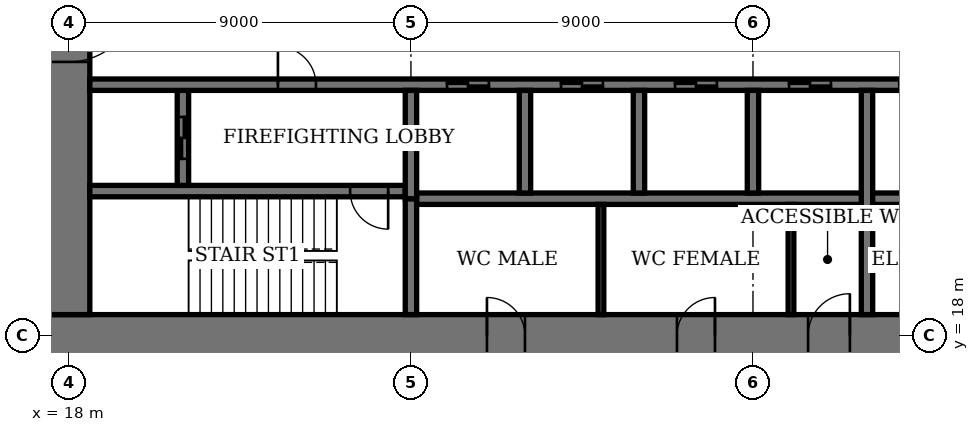
"""IFC4 building model, lengths in metres.
Left out: names, types, materials, properties, quantities, classifications, styles, units other than length and angle.
Written with IfcOpenShell. Run it as: python <this file> out.ifc"""

import sys

from ifc_helpers import new_model, si_unit, direction, frame, frame_2d, origin, place, context, subcontext, project, spatial, rectangle, extrude, element, fill, save


model = new_model("IFC4")
c1 = context("Model", 3, precision=1e-05, world=origin(), true_north=direction((0.0, 1.0)))
c2 = subcontext(c1, "Body", "Model", "MODEL_VIEW")
j1 = project(units=[si_unit("LENGTHUNIT", "METRE"), si_unit("PLANEANGLEUNIT", "RADIAN")], contexts=[c1])
p1 = place(None, origin())
s1 = spatial("IfcSite", under=j1, at=p1, CompositionType="ELEMENT")
p2 = place(p1, origin())
s2 = spatial("IfcBuilding", under=s1, at=p2, CompositionType="ELEMENT")
p3 = place(p2, frame((0.0, 0.0, 35.8)))
s3 = spatial("IfcBuildingStorey", under=s2, at=p3, CompositionType="ELEMENT", Elevation=35.8)
p4 = place(p3, frame((17.45, 18.0, 0.0), z_axis=(0.0, 0.0, 1.0), x_axis=(1.0, 0.0, 0.0)))
e1 = element("IfcWall", 1, at=p4, inside=s3, PredefinedType="SHEAR", context=c2, shape_type="SweptSolid", body=[
    extrude(rectangle(XDim=28.1, YDim=1.1, at=frame_2d((14.05, 0.0))), origin(), (0.0, 0.0, 1.0), 4.0),
])
p5 = place(p4, frame((11.55, 0.0, 0.0)))
e2 = element("IfcOpeningElement", 2, at=p5, cuts=e1, PredefinedType="OPENING", context=c2, shape_type="SweptSolid", body=[
    extrude(rectangle(XDim=1.0, YDim=2.4, at=frame_2d((0.5, 1.2))), frame((0.0, 0.56, 0.0), z_axis=(0.0, -1.0, 0.0), x_axis=(1.0, 0.0, 0.0)), (0.0, 0.0, 1.0), 1.12),
])
p6 = place(p4, frame((16.55, 0.0, 0.0)))
e3 = element("IfcOpeningElement", 3, at=p6, cuts=e1, PredefinedType="OPENING", context=c2, shape_type="SweptSolid", body=[
    extrude(rectangle(XDim=1.0, YDim=2.4, at=frame_2d((0.5, 1.2))), frame((0.0, 0.56, 0.0), z_axis=(0.0, -1.0, 0.0), x_axis=(1.0, 0.0, 0.0)), (0.0, 0.0, 1.0), 1.12),
])
p7 = place(p4, frame((20.0, 0.0, 0.0)))
e4 = element("IfcOpeningElement", 4, at=p7, cuts=e1, PredefinedType="OPENING", context=c2, shape_type="SweptSolid", body=[
    extrude(rectangle(XDim=1.1, YDim=2.4, at=frame_2d((0.55, 1.2))), frame((0.0, 0.56, 0.0), z_axis=(0.0, -1.0, 0.0), x_axis=(1.0, 0.0, 0.0)), (0.0, 0.0, 1.0), 1.12),
])
p8 = place(p4, frame((24.05, 0.0, 0.0)))
e5 = element("IfcOpeningElement", 5, at=p8, cuts=e1, PredefinedType="OPENING", context=c2, shape_type="SweptSolid", body=[
    extrude(rectangle(XDim=1.0, YDim=2.4, at=frame_2d((0.5, 1.2))), frame((0.0, 0.56, 0.0), z_axis=(0.0, -1.0, 0.0), x_axis=(1.0, 0.0, 0.0)), (0.0, 0.0, 1.0), 1.12),
])
p9 = place(p3, frame((18.0, 35.45, 0.0), z_axis=(0.0, 0.0, 1.0), x_axis=(0.0, -1.0, 0.0)))
e6 = element("IfcWall", 6, at=p9, inside=s3, PredefinedType="SHEAR", context=c2, shape_type="SweptSolid", body=[
    extrude(rectangle(XDim=16.9, YDim=1.1, at=frame_2d((8.45, 0.0))), origin(), (0.0, 0.0, 1.0), 4.0),
])
p10 = place(p9, frame((8.45, 0.0, 0.0)))
e7 = element("IfcOpeningElement", 7, at=p10, cuts=e6, PredefinedType="OPENING", context=c2, shape_type="SweptSolid", body=[
    extrude(rectangle(XDim=1.8, YDim=2.4, at=frame_2d((0.9, 1.2))), frame((0.0, 0.56, 0.0), z_axis=(0.0, -1.0, 0.0), x_axis=(1.0, 0.0, 0.0)), (0.0, 0.0, 1.0), 1.12),
])
p11 = place(p3, frame((18.55, 21.8, 0.0), z_axis=(0.0, 0.0, 1.0), x_axis=(1.0, 0.0, 0.0)))
e8 = element("IfcWall", 8, at=p11, inside=s3, PredefinedType="SHEAR", context=c2, shape_type="SweptSolid", body=[
    extrude(rectangle(XDim=8.3, YDim=0.3, at=frame_2d((4.15, 0.0))), origin(), (0.0, 0.0, 1.0), 4.0),
])
p12 = place(p11, frame((6.85, 0.0, 0.0)))
e9 = element("IfcOpeningElement", 9, at=p12, cuts=e8, PredefinedType="OPENING", context=c2, shape_type="SweptSolid", body=[
    extrude(rectangle(XDim=1.0, YDim=2.4, at=frame_2d((0.5, 1.2))), frame((0.0, 0.16, 0.0), z_axis=(0.0, -1.0, 0.0), x_axis=(1.0, 0.0, 0.0)), (0.0, 0.0, 1.0), 0.32),
])
p13 = place(p3, frame((27.0, 18.55, 0.0), z_axis=(0.0, 0.0, 1.0), x_axis=(0.0, 1.0, 0.0)))
e10 = element("IfcWall", 10, at=p13, inside=s3, PredefinedType="SHEAR", context=c2, shape_type="SweptSolid", body=[
    extrude(rectangle(XDim=3.05, YDim=0.3, at=frame_2d((1.525, 0.0))), origin(), (0.0, 0.0, 1.0), 4.0),
])
p14 = place(p3, frame((21.0, 21.95, 0.0), z_axis=(0.0, 0.0, 1.0), x_axis=(0.0, 1.0, 0.0)))
e11 = element("IfcWall", 11, at=p14, inside=s3, PredefinedType="SHEAR", context=c2, shape_type="SweptSolid", body=[
    extrude(rectangle(XDim=2.5, YDim=0.3, at=frame_2d((1.25, 0.0))), origin(), (0.0, 0.0, 1.0), 4.0),
])
p15 = place(p14, frame((0.7, 0.0, 0.0)))
e12 = element("IfcOpeningElement", 12, at=p15, cuts=e11, PredefinedType="OPENING", context=c2, shape_type="SweptSolid", body=[
    extrude(rectangle(XDim=1.1, YDim=2.4, at=frame_2d((0.55, 1.2))), frame((0.0, 0.16, 0.0), z_axis=(0.0, -1.0, 0.0), x_axis=(1.0, 0.0, 0.0)), (0.0, 0.0, 1.0), 0.32),
])
p16 = place(p3, frame((18.55, 24.6, 0.0), z_axis=(0.0, 0.0, 1.0), x_axis=(1.0, 0.0, 0.0)))
e13 = element("IfcWall", 13, at=p16, inside=s3, PredefinedType="SHEAR", context=c2, shape_type="SweptSolid", body=[
    extrude(rectangle(XDim=25.9, YDim=0.3, at=frame_2d((12.95, 0.0))), origin(), (0.0, 0.0, 1.0), 4.0),
])
p17 = place(p16, frame((4.95, 0.0, 0.0)))
e14 = element("IfcOpeningElement", 14, at=p17, cuts=e13, PredefinedType="OPENING", context=c2, shape_type="SweptSolid", body=[
    extrude(rectangle(XDim=1.0, YDim=2.4, at=frame_2d((0.5, 1.2))), frame((0.0, 0.16, 0.0), z_axis=(0.0, -1.0, 0.0), x_axis=(1.0, 0.0, 0.0)), (0.0, 0.0, 1.0), 0.32),
])
p18 = place(p16, frame((24.5, 0.0, 0.0)))
e15 = element("IfcOpeningElement", 15, at=p18, cuts=e13, PredefinedType="OPENING", context=c2, shape_type="SweptSolid", body=[
    extrude(rectangle(XDim=0.9, YDim=2.1, at=frame_2d((0.45, 1.05))), frame((0.0, 0.16, 0.0), z_axis=(0.0, -1.0, 0.0), x_axis=(1.0, 0.0, 0.0)), (0.0, 0.0, 1.0), 0.32),
])
p19 = place(p16, frame((9.4, 0.0, 0.0)))
e16 = element("IfcOpeningElement", 16, at=p19, cuts=e13, PredefinedType="OPENING", context=c2, shape_type="SweptSolid", body=[
    extrude(rectangle(XDim=1.1, YDim=2.4, at=frame_2d((0.55, 1.2))), frame((0.0, 0.16, 0.0), z_axis=(0.0, -1.0, 0.0), x_axis=(1.0, 0.0, 0.0)), (0.0, 0.0, 1.0), 0.32),
])
p20 = place(p16, frame((12.4, 0.0, 0.0)))
e17 = element("IfcOpeningElement", 17, at=p20, cuts=e13, PredefinedType="OPENING", context=c2, shape_type="SweptSolid", body=[
    extrude(rectangle(XDim=1.1, YDim=2.4, at=frame_2d((0.55, 1.2))), frame((0.0, 0.16, 0.0), z_axis=(0.0, -1.0, 0.0), x_axis=(1.0, 0.0, 0.0)), (0.0, 0.0, 1.0), 0.32),
])
p21 = place(p16, frame((15.4, 0.0, 0.0)))
e18 = element("IfcOpeningElement", 18, at=p21, cuts=e13, PredefinedType="OPENING", context=c2, shape_type="SweptSolid", body=[
    extrude(rectangle(XDim=1.1, YDim=2.4, at=frame_2d((0.55, 1.2))), frame((0.0, 0.16, 0.0), z_axis=(0.0, -1.0, 0.0), x_axis=(1.0, 0.0, 0.0)), (0.0, 0.0, 1.0), 0.32),
])
p22 = place(p16, frame((18.4, 0.0, 0.0)))
e19 = element("IfcOpeningElement", 19, at=p22, cuts=e13, PredefinedType="OPENING", context=c2, shape_type="SweptSolid", body=[
    extrude(rectangle(XDim=1.1, YDim=2.4, at=frame_2d((0.55, 1.2))), frame((0.0, 0.16, 0.0), z_axis=(0.0, -1.0, 0.0), x_axis=(1.0, 0.0, 0.0)), (0.0, 0.0, 1.0), 0.32),
])
p23 = place(p16, frame((21.3, 0.0, 0.0)))
e20 = element("IfcOpeningElement", 20, at=p23, cuts=e13, PredefinedType="OPENING", context=c2, shape_type="SweptSolid", body=[
    extrude(rectangle(XDim=1.3, YDim=2.4, at=frame_2d((0.65, 1.2))), frame((0.0, 0.16, 0.0), z_axis=(0.0, -1.0, 0.0), x_axis=(1.0, 0.0, 0.0)), (0.0, 0.0, 1.0), 0.32),
])
p24 = place(p3, frame((27.15, 21.6, 0.0), z_axis=(0.0, 0.0, 1.0), x_axis=(1.0, 0.0, 0.0)))
e21 = element("IfcWall", 21, at=p24, inside=s3, PredefinedType="SHEAR", context=c2, shape_type="SweptSolid", body=[
    extrude(rectangle(XDim=17.3, YDim=0.3, at=frame_2d((8.65, 0.0))), origin(), (0.0, 0.0, 1.0), 4.0),
])
for number, where, z_axis, x_axis in (
    (22, (30.0, 21.75, 0.0), (0.0, 0.0, 1.0), (0.0, 1.0, 0.0)),
    (23, (33.0, 21.75, 0.0), (0.0, 0.0, 1.0), (0.0, 1.0, 0.0)),
    (24, (36.0, 21.75, 0.0), (0.0, 0.0, 1.0), (0.0, 1.0, 0.0)),
):
    element("IfcWall", number, at=place(p3, frame(where, z_axis=z_axis, x_axis=x_axis)), inside=s3, PredefinedType="SHEAR", context=c2, shape_type="SweptSolid", body=[
        extrude(rectangle(XDim=2.7, YDim=0.3, at=frame_2d((1.35, 0.0))), origin(), (0.0, 0.0, 1.0), 4.0),
    ])
p25 = place(p3, frame((39.0, 18.55, 0.0), z_axis=(0.0, 0.0, 1.0), x_axis=(0.0, 1.0, 0.0)))
e25 = element("IfcWall", 25, at=p25, inside=s3, PredefinedType="SHEAR", context=c2, shape_type="SweptSolid", body=[
    extrude(rectangle(XDim=5.9, YDim=0.3, at=frame_2d((2.95, 0.0))), origin(), (0.0, 0.0, 1.0), 4.0),
])
p26 = place(p3, frame((27.0, 21.6, 0.0), z_axis=(0.0, 0.0, 1.0), x_axis=(0.0, 1.0, 0.0)))
e26 = element("IfcWall", 26, at=p26, inside=s3, PredefinedType="SHEAR", context=c2, shape_type="SweptSolid", body=[
    extrude(rectangle(XDim=2.85, YDim=0.3, at=frame_2d((1.425, 0.0))), origin(), (0.0, 0.0, 1.0), 4.0),
])
for number, where, z_axis, x_axis in (
    (27, (32.0, 18.55, 0.0), (0.0, 0.0, 1.0), (0.0, 1.0, 0.0)),
    (28, (37.0, 18.55, 0.0), (0.0, 0.0, 1.0), (0.0, 1.0, 0.0)),
):
    element("IfcWall", number, at=place(p3, frame(where, z_axis=z_axis, x_axis=x_axis)), inside=s3, PredefinedType="PARTITIONING", context=c2, shape_type="SweptSolid", body=[
        extrude(rectangle(XDim=2.9, YDim=0.15, at=frame_2d((1.45, 0.0))), origin(), (0.0, 0.0, 1.0), 3.75),
    ])
p27 = place(p10, origin())
e29 = element("IfcDoor", 29, at=p27, inside=s3, OperationType="DOUBLE_DOOR_DOUBLE_SWING", PredefinedType="DOOR", context=c2, shape_type="SweptSolid", body=[
    extrude(rectangle(XDim=1.8, YDim=2.4, at=frame_2d((0.9, 1.2))), frame((0.0, 0.03, 0.0), z_axis=(0.0, -1.0, 0.0), x_axis=(1.0, 0.0, 0.0)), (0.0, 0.0, 1.0), 0.06),
    extrude(rectangle(XDim=0.04, YDim=2.4, at=frame_2d((0.02, 1.2))), frame((0.0, 0.55, 0.0), z_axis=(0.0, -1.0, 0.0), x_axis=(1.0, 0.0, 0.0)), (0.0, 0.0, 1.0), 1.1),
    extrude(rectangle(XDim=0.04, YDim=2.4, at=frame_2d((1.78, 1.2))), frame((0.0, 0.55, 0.0), z_axis=(0.0, -1.0, 0.0), x_axis=(1.0, 0.0, 0.0)), (0.0, 0.0, 1.0), 1.1),
    extrude(rectangle(XDim=1.8, YDim=0.04, at=frame_2d((0.9, 2.38))), frame((0.0, 0.55, 0.0), z_axis=(0.0, -1.0, 0.0), x_axis=(1.0, 0.0, 0.0)), (0.0, 0.0, 1.0), 1.1),
])
fill(e7, e29)
p28 = place(p5, origin())
e30 = element("IfcDoor", 30, at=p28, inside=s3, OperationType="SINGLE_SWING_RIGHT", PredefinedType="DOOR", context=c2, shape_type="SweptSolid", body=[
    extrude(rectangle(XDim=1.0, YDim=2.4, at=frame_2d((0.5, 1.2))), frame((0.0, 0.025, 0.0), z_axis=(0.0, -1.0, 0.0), x_axis=(1.0, 0.0, 0.0)), (0.0, 0.0, 1.0), 0.05),
    extrude(rectangle(XDim=0.04, YDim=2.4, at=frame_2d((0.02, 1.2))), frame((0.0, 0.4, 0.0), z_axis=(0.0, -1.0, 0.0), x_axis=(1.0, 0.0, 0.0)), (0.0, 0.0, 1.0), 0.8),
    extrude(rectangle(XDim=0.04, YDim=2.4, at=frame_2d((0.98, 1.2))), frame((0.0, 0.4, 0.0), z_axis=(0.0, -1.0, 0.0), x_axis=(1.0, 0.0, 0.0)), (0.0, 0.0, 1.0), 0.8),
    extrude(rectangle(XDim=1.0, YDim=0.04, at=frame_2d((0.5, 2.38))), frame((0.0, 0.4, 0.0), z_axis=(0.0, -1.0, 0.0), x_axis=(1.0, 0.0, 0.0)), (0.0, 0.0, 1.0), 0.8),
])
fill(e2, e30)
p29 = place(p6, origin())
e31 = element("IfcDoor", 31, at=p29, inside=s3, OperationType="SINGLE_SWING_LEFT", PredefinedType="DOOR", context=c2, shape_type="SweptSolid", body=[
    extrude(rectangle(XDim=1.0, YDim=2.4, at=frame_2d((0.5, 1.2))), frame((0.0, 0.025, 0.0), z_axis=(0.0, -1.0, 0.0), x_axis=(1.0, 0.0, 0.0)), (0.0, 0.0, 1.0), 0.05),
    extrude(rectangle(XDim=0.04, YDim=2.4, at=frame_2d((0.02, 1.2))), frame((0.0, 0.4, 0.0), z_axis=(0.0, -1.0, 0.0), x_axis=(1.0, 0.0, 0.0)), (0.0, 0.0, 1.0), 0.8),
    extrude(rectangle(XDim=0.04, YDim=2.4, at=frame_2d((0.98, 1.2))), frame((0.0, 0.4, 0.0), z_axis=(0.0, -1.0, 0.0), x_axis=(1.0, 0.0, 0.0)), (0.0, 0.0, 1.0), 0.8),
    extrude(rectangle(XDim=1.0, YDim=0.04, at=frame_2d((0.5, 2.38))), frame((0.0, 0.4, 0.0), z_axis=(0.0, -1.0, 0.0), x_axis=(1.0, 0.0, 0.0)), (0.0, 0.0, 1.0), 0.8),
])
fill(e3, e31)
p30 = place(p7, origin())
e32 = element("IfcDoor", 32, at=p30, inside=s3, OperationType="SINGLE_SWING_LEFT", PredefinedType="DOOR", context=c2, shape_type="SweptSolid", body=[
    extrude(rectangle(XDim=1.1, YDim=2.4, at=frame_2d((0.55, 1.2))), frame((0.0, 0.025, 0.0), z_axis=(0.0, -1.0, 0.0), x_axis=(1.0, 0.0, 0.0)), (0.0, 0.0, 1.0), 0.05),
    extrude(rectangle(XDim=0.04, YDim=2.4, at=frame_2d((0.02, 1.2))), frame((0.0, 0.44, 0.0), z_axis=(0.0, -1.0, 0.0), x_axis=(1.0, 0.0, 0.0)), (0.0, 0.0, 1.0), 0.88),
    extrude(rectangle(XDim=0.04, YDim=2.4, at=frame_2d((1.08, 1.2))), frame((0.0, 0.44, 0.0), z_axis=(0.0, -1.0, 0.0), x_axis=(1.0, 0.0, 0.0)), (0.0, 0.0, 1.0), 0.88),
    extrude(rectangle(XDim=1.1, YDim=0.04, at=frame_2d((0.55, 2.38))), frame((0.0, 0.44, 0.0), z_axis=(0.0, -1.0, 0.0), x_axis=(1.0, 0.0, 0.0)), (0.0, 0.0, 1.0), 0.88),
])
fill(e4, e32)
p31 = place(p12, origin())
e33 = element("IfcDoor", 33, at=p31, inside=s3, OperationType="SINGLE_SWING_RIGHT", PredefinedType="DOOR", context=c2, shape_type="SweptSolid", body=[
    extrude(rectangle(XDim=1.0, YDim=2.4, at=frame_2d((0.5, 1.2))), frame((0.0, 0.03, 0.0), z_axis=(0.0, -1.0, 0.0), x_axis=(1.0, 0.0, 0.0)), (0.0, 0.0, 1.0), 0.06),
])
fill(e9, e33)
p32 = place(p17, origin())
e34 = element("IfcDoor", 34, at=p32, inside=s3, OperationType="SINGLE_SWING_RIGHT", PredefinedType="DOOR", context=c2, shape_type="SweptSolid", body=[
    extrude(rectangle(XDim=1.0, YDim=2.4, at=frame_2d((0.5, 1.2))), frame((0.0, 0.03, 0.0), z_axis=(0.0, -1.0, 0.0), x_axis=(1.0, 0.0, 0.0)), (0.0, 0.0, 1.0), 0.06),
])
fill(e14, e34)
p33 = place(p19, origin())
e35 = element("IfcDoor", 35, at=p33, inside=s3, OperationType="DOUBLE_DOOR_SLIDING", PredefinedType="DOOR", context=c2, shape_type="SweptSolid", body=[
    extrude(rectangle(XDim=1.1, YDim=2.4, at=frame_2d((0.55, 1.2))), frame((0.0, 0.02, 0.0), z_axis=(0.0, -1.0, 0.0), x_axis=(1.0, 0.0, 0.0)), (0.0, 0.0, 1.0), 0.04),
])
fill(e16, e35)
p34 = place(p20, origin())
e36 = element("IfcDoor", 36, at=p34, inside=s3, OperationType="DOUBLE_DOOR_SLIDING", PredefinedType="DOOR", context=c2, shape_type="SweptSolid", body=[
    extrude(rectangle(XDim=1.1, YDim=2.4, at=frame_2d((0.55, 1.2))), frame((0.0, 0.02, 0.0), z_axis=(0.0, -1.0, 0.0), x_axis=(1.0, 0.0, 0.0)), (0.0, 0.0, 1.0), 0.04),
])
fill(e17, e36)
p35 = place(p21, origin())
e37 = element("IfcDoor", 37, at=p35, inside=s3, OperationType="DOUBLE_DOOR_SLIDING", PredefinedType="DOOR", context=c2, shape_type="SweptSolid", body=[
    extrude(rectangle(XDim=1.1, YDim=2.4, at=frame_2d((0.55, 1.2))), frame((0.0, 0.02, 0.0), z_axis=(0.0, -1.0, 0.0), x_axis=(1.0, 0.0, 0.0)), (0.0, 0.0, 1.0), 0.04),
])
fill(e18, e37)
p36 = place(p22, origin())
e38 = element("IfcDoor", 38, at=p36, inside=s3, OperationType="DOUBLE_DOOR_SLIDING", PredefinedType="DOOR", context=c2, shape_type="SweptSolid", body=[
    extrude(rectangle(XDim=1.1, YDim=2.4, at=frame_2d((0.55, 1.2))), frame((0.0, 0.02, 0.0), z_axis=(0.0, -1.0, 0.0), x_axis=(1.0, 0.0, 0.0)), (0.0, 0.0, 1.0), 0.04),
])
fill(e19, e38)
p37 = place(p23, origin())
e39 = element("IfcDoor", 39, at=p37, inside=s3, OperationType="DOUBLE_DOOR_SLIDING", PredefinedType="DOOR", context=c2, shape_type="SweptSolid", body=[
    extrude(rectangle(XDim=1.3, YDim=2.4, at=frame_2d((0.65, 1.2))), frame((0.0, 0.02, 0.0), z_axis=(0.0, -1.0, 0.0), x_axis=(1.0, 0.0, 0.0)), (0.0, 0.0, 1.0), 0.04),
])
fill(e20, e39)
p38 = place(p15, origin())
e40 = element("IfcDoor", 40, at=p38, inside=s3, OperationType="DOUBLE_DOOR_SLIDING", PredefinedType="DOOR", context=c2, shape_type="SweptSolid", body=[
    extrude(rectangle(XDim=1.1, YDim=2.4, at=frame_2d((0.55, 1.2))), frame((0.0, 0.03, 0.0), z_axis=(0.0, -1.0, 0.0), x_axis=(1.0, 0.0, 0.0)), (0.0, 0.0, 1.0), 0.06),
])
fill(e12, e40)
save(model, sys.argv[1])
